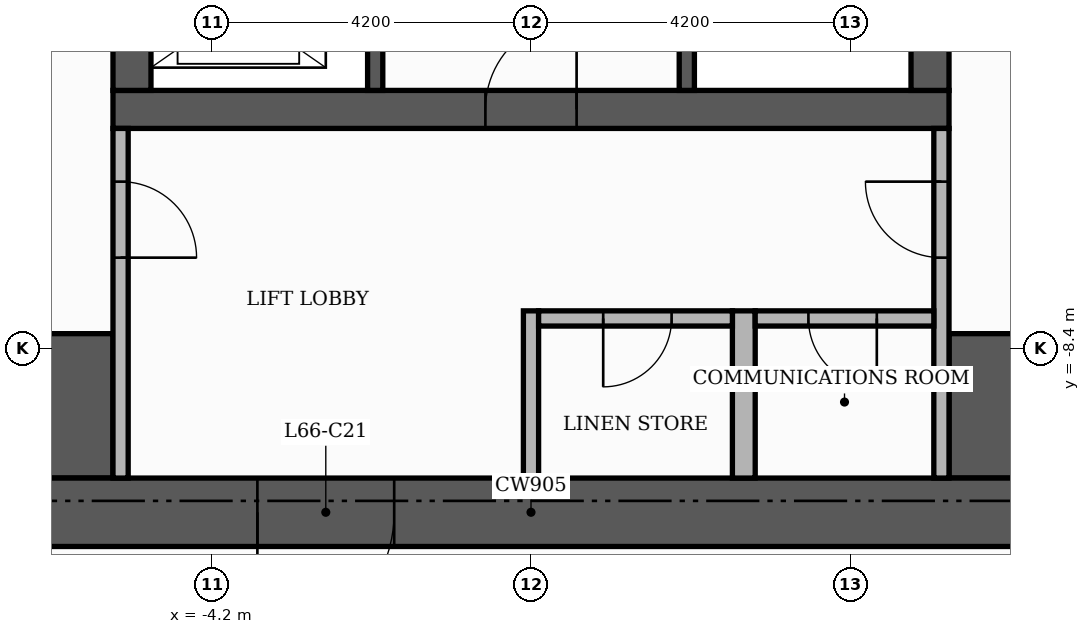
"""IFC4 building model, lengths in metres.
Left out: names, types, materials, properties, quantities, classifications, styles, units other than length and angle.
Written with IfcOpenShell. Run it as: python <this file> out.ifc"""

import sys

from ifc_helpers import new_model, si_unit, direction, frame, frame_2d, origin, place, context, subcontext, project, spatial, rectangle, extrude, element, fill, save


model = new_model("IFC4")
c1 = context("Model", 3, precision=1e-05, world=origin(), true_north=direction((0.0, 1.0)))
c2 = subcontext(c1, "Body", "Model", "MODEL_VIEW")
j1 = project(units=[si_unit("LENGTHUNIT", "METRE"), si_unit("PLANEANGLEUNIT", "RADIAN")], contexts=[c1])
p1 = place(None, origin())
s1 = spatial("IfcSite", under=j1, at=p1, CompositionType="ELEMENT")
p2 = place(p1, origin())
s2 = spatial("IfcBuilding", under=s1, at=p2, CompositionType="ELEMENT")
p3 = place(p2, frame((0.0, 0.0, 275.7)))
s3 = spatial("IfcBuildingStorey", under=s2, at=p3, CompositionType="ELEMENT", Elevation=275.7)
p4 = place(p3, frame((-5.5, -5.25, 0.0), z_axis=(0.0, 0.0, 1.0), x_axis=(1.0, 0.0, 0.0)))
e1 = element("IfcWall", 1, at=p4, inside=s3, PredefinedType="SHEAR", context=c2, shape_type="SweptSolid", body=[
    extrude(rectangle(XDim=11.0, YDim=0.5, at=frame_2d((5.5, 0.0))), origin(), (0.0, 0.0, 1.0), 3.48),
])
p5 = place(p4, frame((4.9, 0.0, 0.0)))
e2 = element("IfcOpeningElement", 2, at=p5, cuts=e1, PredefinedType="OPENING", context=c2, shape_type="SweptSolid", body=[
    extrude(rectangle(XDim=1.2, YDim=2.1, at=frame_2d((0.6, 1.05))), frame((0.0, 0.26, 0.0), z_axis=(0.0, -1.0, 0.0), x_axis=(1.0, 0.0, 0.0)), (0.0, 0.0, 1.0), 0.52),
])
for number, where, z_axis, x_axis in (
    (3, (-5.25, -5.0, 0.0), (0.0, 0.0, 1.0), (0.0, 1.0, 0.0)),
    (4, (5.25, -5.0, 0.0), (0.0, 0.0, 1.0), (0.0, 1.0, 0.0)),
):
    element("IfcWall", number, at=place(p3, frame(where, z_axis=z_axis, x_axis=x_axis)), inside=s3, PredefinedType="SHEAR", context=c2, shape_type="SweptSolid", body=[
        extrude(rectangle(XDim=10.5, YDim=0.5, at=frame_2d((5.25, 0.0))), origin(), (0.0, 0.0, 1.0), 3.48),
    ])
for number, where, z_axis, x_axis in (
    (5, (-10.1, -9.15, 0.0), (0.0, 0.0, 1.0), (1.0, 0.0, 0.0)),
    (6, (5.5, -9.15, 0.0), (0.0, 0.0, 1.0), (1.0, 0.0, 0.0)),
):
    element("IfcWall", number, at=place(p3, frame(where, z_axis=z_axis, x_axis=x_axis)), inside=s3, PredefinedType="SHEAR", context=c2, shape_type="SweptSolid", body=[
        extrude(rectangle(XDim=4.6, YDim=1.9, at=frame_2d((2.3, 0.0))), origin(), (0.0, 0.0, 1.0), 3.48),
    ])
p6 = place(p3, frame((2.05, -5.0, 0.0), z_axis=(0.0, 0.0, 1.0), x_axis=(0.0, 1.0, 0.0)))
e7 = element("IfcWall", 7, at=p6, inside=s3, PredefinedType="SHEAR", context=c2, shape_type="SweptSolid", body=[
    extrude(rectangle(XDim=6.6, YDim=0.2, at=frame_2d((3.3, 0.0))), origin(), (0.0, 0.0, 1.0), 3.48),
])
p7 = place(p6, frame((5.25, 0.0, 0.0)))
e8 = element("IfcOpeningElement", 8, at=p7, cuts=e7, PredefinedType="OPENING", context=c2, shape_type="SweptSolid", body=[
    extrude(rectangle(XDim=1.0, YDim=2.1, at=frame_2d((0.5, 1.05))), frame((0.0, 0.11, 0.0), z_axis=(0.0, -1.0, 0.0), x_axis=(1.0, 0.0, 0.0)), (0.0, 0.0, 1.0), 0.22),
])
p8 = place(p3, frame((-2.05, -5.0, 0.0), z_axis=(0.0, 0.0, 1.0), x_axis=(0.0, 1.0, 0.0)))
e9 = element("IfcWall", 9, at=p8, inside=s3, PredefinedType="SHEAR", context=c2, shape_type="SweptSolid", body=[
    extrude(rectangle(XDim=3.4, YDim=0.2, at=frame_2d((1.7, 0.0))), origin(), (0.0, 0.0, 1.0), 3.48),
])
p9 = place(p8, frame((0.55, 0.0, 0.0)))
e10 = element("IfcOpeningElement", 10, at=p9, cuts=e9, PredefinedType="OPENING", context=c2, shape_type="SweptSolid", body=[
    extrude(rectangle(XDim=1.1, YDim=2.1, at=frame_2d((0.55, 1.05))), frame((0.0, 0.11, 0.0), z_axis=(0.0, -1.0, 0.0), x_axis=(1.0, 0.0, 0.0)), (0.0, 0.0, 1.0), 0.22),
])
p10 = place(p8, frame((2.45, 0.0, 0.0)))
e11 = element("IfcOpeningElement", 11, at=p10, cuts=e9, PredefinedType="OPENING", context=c2, shape_type="SweptSolid", body=[
    extrude(rectangle(XDim=0.8, YDim=2.1, at=frame_2d((0.4, 1.05))), frame((0.0, 0.11, 0.0), z_axis=(0.0, -1.0, 0.0), x_axis=(1.0, 0.0, 0.0)), (0.0, 0.0, 1.0), 0.22),
])
p11 = place(p3, frame((-11.0, -10.55, 0.0), z_axis=(0.0, 0.0, 1.0), x_axis=(1.0, 0.0, 0.0)))
e12 = element("IfcWall", 12, at=p11, inside=s3, PredefinedType="SHEAR", context=c2, shape_type="SweptSolid", body=[
    extrude(rectangle(XDim=22.0, YDim=0.9, at=frame_2d((11.0, 0.0))), origin(), (0.0, 0.0, 1.0), 3.48),
])
p12 = place(p11, frame((7.4, 0.0, 0.0)))
e13 = element("IfcOpeningElement", 13, at=p12, cuts=e12, PredefinedType="OPENING", context=c2, shape_type="SweptSolid", body=[
    extrude(rectangle(XDim=1.8, YDim=2.2, at=frame_2d((0.9, 1.1))), frame((0.0, 0.46, 0.0), z_axis=(0.0, -1.0, 0.0), x_axis=(1.0, 0.0, 0.0)), (0.0, 0.0, 1.0), 0.92),
])
p13 = place(p3, frame((-5.4, -10.1, 0.0), z_axis=(0.0, 0.0, 1.0), x_axis=(0.0, 1.0, 0.0)))
e14 = element("IfcWall", 14, at=p13, inside=s3, PredefinedType="PARTITIONING", context=c2, shape_type="SweptSolid", body=[
    extrude(rectangle(XDim=4.6, YDim=0.2, at=frame_2d((2.3, 0.0))), origin(), (0.0, 0.0, 1.0), 3.48),
])
p14 = place(p13, frame((2.9, 0.0, 0.0)))
e15 = element("IfcOpeningElement", 15, at=p14, cuts=e14, PredefinedType="OPENING", context=c2, shape_type="SweptSolid", body=[
    extrude(rectangle(XDim=1.0, YDim=2.1, at=frame_2d((0.5, 1.05))), frame((0.0, 0.11, 0.0), z_axis=(0.0, -1.0, 0.0), x_axis=(1.0, 0.0, 0.0)), (0.0, 0.0, 1.0), 0.22),
])
p15 = place(p3, frame((0.0, -10.1, 0.0), z_axis=(0.0, 0.0, 1.0), x_axis=(0.0, 1.0, 0.0)))
e16 = element("IfcWall", 16, at=p15, inside=s3, PredefinedType="PARTITIONING", context=c2, shape_type="SweptSolid", body=[
    extrude(rectangle(XDim=2.2, YDim=0.2, at=frame_2d((1.1, 0.0))), origin(), (0.0, 0.0, 1.0), 3.48),
])
p16 = place(p3, frame((2.8, -10.1, 0.0), z_axis=(0.0, 0.0, 1.0), x_axis=(0.0, 1.0, 0.0)))
e17 = element("IfcWall", 17, at=p16, inside=s3, PredefinedType="PARTITIONING", context=c2, shape_type="SweptSolid", body=[
    extrude(rectangle(XDim=2.2, YDim=0.3, at=frame_2d((1.1, 0.0))), origin(), (0.0, 0.0, 1.0), 3.48),
])
p17 = place(p3, frame((5.4, -10.1, 0.0), z_axis=(0.0, 0.0, 1.0), x_axis=(0.0, 1.0, 0.0)))
e18 = element("IfcWall", 18, at=p17, inside=s3, PredefinedType="PARTITIONING", context=c2, shape_type="SweptSolid", body=[
    extrude(rectangle(XDim=4.6, YDim=0.2, at=frame_2d((2.3, 0.0))), origin(), (0.0, 0.0, 1.0), 3.48),
])
p18 = place(p17, frame((2.9, 0.0, 0.0)))
e19 = element("IfcOpeningElement", 19, at=p18, cuts=e18, PredefinedType="OPENING", context=c2, shape_type="SweptSolid", body=[
    extrude(rectangle(XDim=1.0, YDim=2.1, at=frame_2d((0.5, 1.05))), frame((0.0, 0.11, 0.0), z_axis=(0.0, -1.0, 0.0), x_axis=(1.0, 0.0, 0.0)), (0.0, 0.0, 1.0), 0.22),
])
p19 = place(p3, frame((0.1, -8.0, 0.0), z_axis=(0.0, 0.0, 1.0), x_axis=(1.0, 0.0, 0.0)))
e20 = element("IfcWall", 20, at=p19, inside=s3, PredefinedType="PARTITIONING", context=c2, shape_type="SweptSolid", body=[
    extrude(rectangle(XDim=2.55, YDim=0.2, at=frame_2d((1.275, 0.0))), origin(), (0.0, 0.0, 1.0), 3.48),
])
p20 = place(p19, frame((0.85, 0.0, 0.0)))
e21 = element("IfcOpeningElement", 21, at=p20, cuts=e20, PredefinedType="OPENING", context=c2, shape_type="SweptSolid", body=[
    extrude(rectangle(XDim=0.9, YDim=2.1, at=frame_2d((0.45, 1.05))), frame((0.0, 0.11, 0.0), z_axis=(0.0, -1.0, 0.0), x_axis=(1.0, 0.0, 0.0)), (0.0, 0.0, 1.0), 0.22),
])
p21 = place(p3, frame((2.95, -8.0, 0.0), z_axis=(0.0, 0.0, 1.0), x_axis=(1.0, 0.0, 0.0)))
e22 = element("IfcWall", 22, at=p21, inside=s3, PredefinedType="PARTITIONING", context=c2, shape_type="SweptSolid", body=[
    extrude(rectangle(XDim=2.35, YDim=0.2, at=frame_2d((1.175, 0.0))), origin(), (0.0, 0.0, 1.0), 3.48),
])
p22 = place(p21, frame((0.7, 0.0, 0.0)))
e23 = element("IfcOpeningElement", 23, at=p22, cuts=e22, PredefinedType="OPENING", context=c2, shape_type="SweptSolid", body=[
    extrude(rectangle(XDim=0.9, YDim=2.1, at=frame_2d((0.45, 1.05))), frame((0.0, 0.11, 0.0), z_axis=(0.0, -1.0, 0.0), x_axis=(1.0, 0.0, 0.0)), (0.0, 0.0, 1.0), 0.22),
])
p23 = place(p5, origin())
e24 = element("IfcDoor", 24, at=p23, inside=s3, OperationType="SINGLE_SWING_RIGHT", PredefinedType="DOOR", context=c2, shape_type="SweptSolid", body=[
    extrude(rectangle(XDim=1.2, YDim=2.1, at=frame_2d((0.6, 1.05))), frame((0.0, 0.025, 0.0), z_axis=(0.0, -1.0, 0.0), x_axis=(1.0, 0.0, 0.0)), (0.0, 0.0, 1.0), 0.05),
])
fill(e2, e24)
p24 = place(p14, frame((1.0, 0.0, 0.0), z_axis=(0.0, 0.0, 1.0), x_axis=(-1.0, 0.0, 0.0)))
e25 = element("IfcDoor", 25, at=p24, inside=s3, OperationType="SINGLE_SWING_LEFT", PredefinedType="DOOR", context=c2, shape_type="SweptSolid", body=[
    extrude(rectangle(XDim=1.0, YDim=2.1, at=frame_2d((0.5, 1.05))), frame((0.0, 0.025, 0.0), z_axis=(0.0, -1.0, 0.0), x_axis=(1.0, 0.0, 0.0)), (0.0, 0.0, 1.0), 0.05),
])
fill(e15, e25)
p25 = place(p18, origin())
e26 = element("IfcDoor", 26, at=p25, inside=s3, OperationType="SINGLE_SWING_RIGHT", PredefinedType="DOOR", context=c2, shape_type="SweptSolid", body=[
    extrude(rectangle(XDim=1.0, YDim=2.1, at=frame_2d((0.5, 1.05))), frame((0.0, 0.025, 0.0), z_axis=(0.0, -1.0, 0.0), x_axis=(1.0, 0.0, 0.0)), (0.0, 0.0, 1.0), 0.05),
])
fill(e19, e26)
p26 = place(p12, frame((1.8, 0.0, 0.0), z_axis=(0.0, 0.0, 1.0), x_axis=(-1.0, 0.0, 0.0)))
e27 = element("IfcDoor", 27, at=p26, inside=s3, OperationType="DOUBLE_DOOR_SINGLE_SWING", PredefinedType="DOOR", context=c2, shape_type="SweptSolid", body=[
    extrude(rectangle(XDim=1.8, YDim=2.2, at=frame_2d((0.9, 1.1))), frame((0.0, 0.025, 0.0), z_axis=(0.0, -1.0, 0.0), x_axis=(1.0, 0.0, 0.0)), (0.0, 0.0, 1.0), 0.05),
])
fill(e13, e27)
p27 = place(p20, frame((0.9, 0.0, 0.0), z_axis=(0.0, 0.0, 1.0), x_axis=(-1.0, 0.0, 0.0)))
e28 = element("IfcDoor", 28, at=p27, inside=s3, OperationType="SINGLE_SWING_LEFT", PredefinedType="DOOR", context=c2, shape_type="SweptSolid", body=[
    extrude(rectangle(XDim=0.9, YDim=2.1, at=frame_2d((0.45, 1.05))), frame((0.0, 0.025, 0.0), z_axis=(0.0, -1.0, 0.0), x_axis=(1.0, 0.0, 0.0)), (0.0, 0.0, 1.0), 0.05),
])
fill(e21, e28)
p28 = place(p22, frame((0.9, 0.0, 0.0), z_axis=(0.0, 0.0, 1.0), x_axis=(-1.0, 0.0, 0.0)))
e29 = element("IfcDoor", 29, at=p28, inside=s3, OperationType="SINGLE_SWING_RIGHT", PredefinedType="DOOR", context=c2, shape_type="SweptSolid", body=[
    extrude(rectangle(XDim=0.9, YDim=2.1, at=frame_2d((0.45, 1.05))), frame((0.0, 0.025, 0.0), z_axis=(0.0, -1.0, 0.0), x_axis=(1.0, 0.0, 0.0)), (0.0, 0.0, 1.0), 0.05),
])
fill(e23, e29)
save(model, sys.argv[1])
